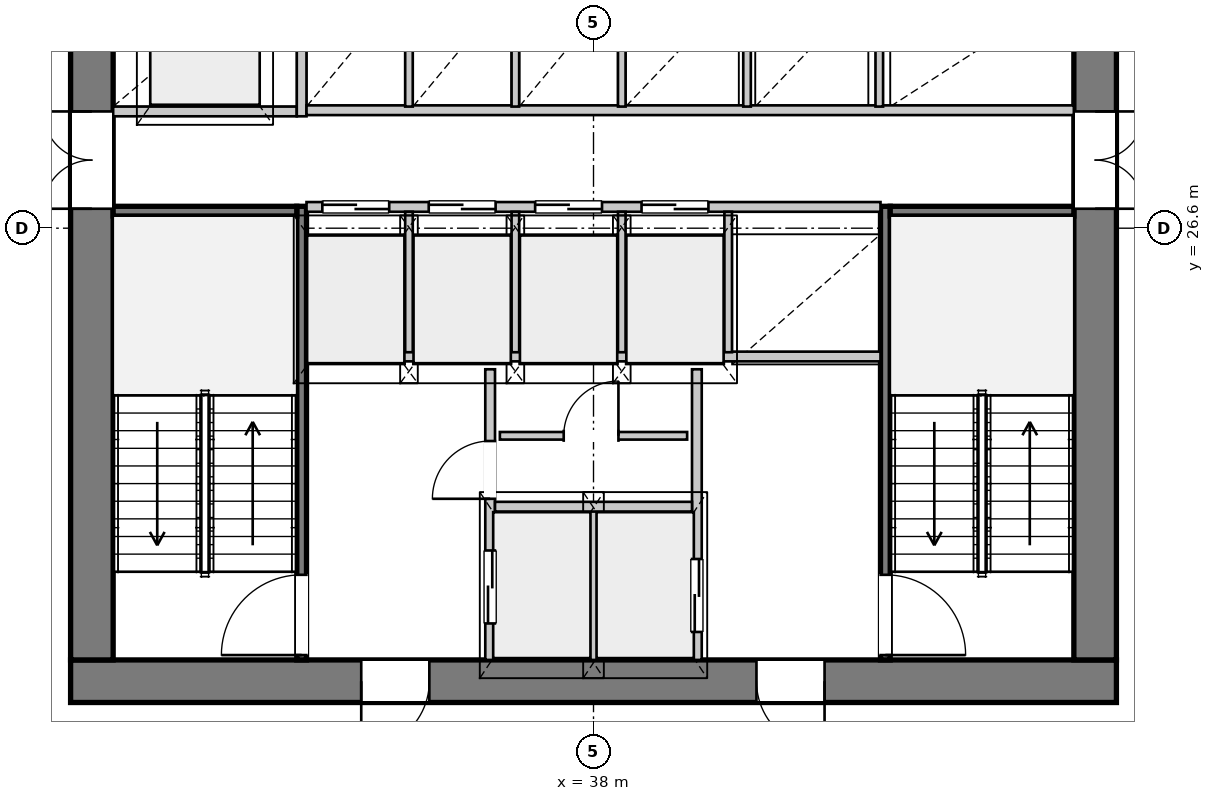
"""IFC4 building model, lengths in metres.
Left out: names, types, materials, properties, quantities, classifications, styles, units other than length and angle.
Written with IfcOpenShell. Run it as: python <this file> out.ifc"""

import sys

from ifc_helpers import new_model, si_unit, direction, frame, frame_2d, origin, place, context, subcontext, project, spatial, rectangle, extrude, source, transform, mapped, element, fill, save


model = new_model("IFC4")
c1 = context("Model", 3, precision=1e-05, world=origin(), true_north=direction((0.0, 1.0)))
c2 = subcontext(c1, "Body", "Model", "MODEL_VIEW")
j1 = project(units=[si_unit("LENGTHUNIT", "METRE"), si_unit("PLANEANGLEUNIT", "RADIAN")], contexts=[c1])
p1 = place(None, origin())
s1 = spatial("IfcSite", under=j1, at=p1, CompositionType="ELEMENT")
p2 = place(p1, origin())
s2 = spatial("IfcBuilding", under=s1, at=p2, CompositionType="ELEMENT")
p3 = place(p2, frame((0.0, 0.0, 116.35)))
s3 = spatial("IfcBuildingStorey", under=s2, at=p3, CompositionType="ELEMENT", Elevation=116.35)
p4 = place(p3, frame((46.6, 19.15, 0.0), z_axis=(0.0, 0.0, 1.0), x_axis=(-1.0, 0.0, 0.0)))
e1 = element("IfcWall", 1, at=p4, inside=s3, PredefinedType="SHEAR", context=c2, shape_type="SweptSolid", body=[
    extrude(rectangle(XDim=17.2, YDim=0.7, at=frame_2d((8.6, 0.0))), origin(), (0.0, 0.0, 1.0), 3.3),
])
p5 = place(p4, frame((4.8, 0.0, 0.0)))
e2 = element("IfcOpeningElement", 2, at=p5, cuts=e1, PredefinedType="OPENING", context=c2, shape_type="SweptSolid", body=[
    extrude(rectangle(XDim=1.12, YDim=2.25, at=frame_2d((0.56, 1.125))), frame((0.0, 0.36, 0.0), z_axis=(0.0, -1.0, 0.0), x_axis=(1.0, 0.0, 0.0)), (0.0, 0.0, 1.0), 0.72),
])
p6 = place(p4, frame((11.3, 0.0, 0.0)))
e3 = element("IfcOpeningElement", 3, at=p6, cuts=e1, PredefinedType="OPENING", context=c2, shape_type="SweptSolid", body=[
    extrude(rectangle(XDim=1.12, YDim=2.25, at=frame_2d((0.56, 1.125))), frame((0.0, 0.36, 0.0), z_axis=(0.0, -1.0, 0.0), x_axis=(1.0, 0.0, 0.0)), (0.0, 0.0, 1.0), 0.72),
])
p7 = place(p3, frame((29.75, 19.5, 0.0), z_axis=(0.0, 0.0, 1.0), x_axis=(0.0, 1.0, 0.0)))
e4 = element("IfcWall", 4, at=p7, inside=s3, PredefinedType="SHEAR", context=c2, shape_type="SweptSolid", body=[
    extrude(rectangle(XDim=14.2, YDim=0.7, at=frame_2d((7.1, 0.0))), origin(), (0.0, 0.0, 1.0), 3.3),
])
p8 = place(p7, frame((7.42, 0.0, 0.0)))
e5 = element("IfcOpeningElement", 5, at=p8, cuts=e4, PredefinedType="OPENING", context=c2, shape_type="SweptSolid", body=[
    extrude(rectangle(XDim=1.6, YDim=2.2, at=frame_2d((0.8, 1.1))), frame((0.0, 0.36, 0.0), z_axis=(0.0, -1.0, 0.0), x_axis=(1.0, 0.0, 0.0)), (0.0, 0.0, 1.0), 0.72),
])
p9 = place(p3, frame((46.25, 33.7, 0.0), z_axis=(0.0, 0.0, 1.0), x_axis=(0.0, -1.0, 0.0)))
e6 = element("IfcWall", 6, at=p9, inside=s3, PredefinedType="SHEAR", context=c2, shape_type="SweptSolid", body=[
    extrude(rectangle(XDim=14.2, YDim=0.7, at=frame_2d((7.1, 0.0))), origin(), (0.0, 0.0, 1.0), 3.3),
])
p10 = place(p9, frame((5.18, 0.0, 0.0)))
e7 = element("IfcOpeningElement", 7, at=p10, cuts=e6, PredefinedType="OPENING", context=c2, shape_type="SweptSolid", body=[
    extrude(rectangle(XDim=1.6, YDim=2.2, at=frame_2d((0.8, 1.1))), frame((0.0, 0.36, 0.0), z_axis=(0.0, -1.0, 0.0), x_axis=(1.0, 0.0, 0.0)), (0.0, 0.0, 1.0), 0.72),
])
p11 = place(p3, frame((33.2, 19.5, 0.0), z_axis=(0.0, 0.0, 1.0), x_axis=(0.0, 1.0, 0.0)))
e8 = element("IfcWall", 8, at=p11, inside=s3, PredefinedType="PARTITIONING", context=c2, shape_type="SweptSolid", body=[
    extrude(rectangle(XDim=7.46, YDim=0.16, at=frame_2d((3.73, 0.0))), origin(), (0.0, 0.0, 1.0), 3.3),
])
p12 = place(p11, frame((0.08, 0.0, 0.0)))
e9 = element("IfcOpeningElement", 9, at=p12, cuts=e8, PredefinedType="OPENING", context=c2, shape_type="SweptSolid", body=[
    extrude(rectangle(XDim=1.32, YDim=2.2, at=frame_2d((0.66, 1.1))), frame((0.0, 0.09, 0.0), z_axis=(0.0, -1.0, 0.0), x_axis=(1.0, 0.0, 0.0)), (0.0, 0.0, 1.0), 0.18),
])
p13 = place(p3, frame((30.1, 26.88, 0.0), z_axis=(0.0, 0.0, 1.0), x_axis=(1.0, 0.0, 0.0)))
e10 = element("IfcWall", 10, at=p13, inside=s3, PredefinedType="PARTITIONING", context=c2, shape_type="SweptSolid", body=[
    extrude(rectangle(XDim=3.02, YDim=0.16, at=frame_2d((1.51, 0.0))), origin(), (0.0, 0.0, 1.0), 3.3),
])
p14 = place(p3, frame((42.8, 26.96, 0.0), z_axis=(0.0, 0.0, 1.0), x_axis=(0.0, -1.0, 0.0)))
e11 = element("IfcWall", 11, at=p14, inside=s3, PredefinedType="PARTITIONING", context=c2, shape_type="SweptSolid", body=[
    extrude(rectangle(XDim=7.46, YDim=0.16, at=frame_2d((3.73, 0.0))), origin(), (0.0, 0.0, 1.0), 3.3),
])
p15 = place(p14, frame((6.06, 0.0, 0.0)))
e12 = element("IfcOpeningElement", 12, at=p15, cuts=e11, PredefinedType="OPENING", context=c2, shape_type="SweptSolid", body=[
    extrude(rectangle(XDim=1.32, YDim=2.2, at=frame_2d((0.66, 1.1))), frame((0.0, 0.09, 0.0), z_axis=(0.0, -1.0, 0.0), x_axis=(1.0, 0.0, 0.0)), (0.0, 0.0, 1.0), 0.18),
])
p16 = place(p3, frame((42.88, 26.88, 0.0), z_axis=(0.0, 0.0, 1.0), x_axis=(1.0, 0.0, 0.0)))
e13 = element("IfcWall", 13, at=p16, inside=s3, PredefinedType="PARTITIONING", context=c2, shape_type="SweptSolid", body=[
    extrude(rectangle(XDim=3.02, YDim=0.16, at=frame_2d((1.51, 0.0))), origin(), (0.0, 0.0, 1.0), 3.3),
])
p17 = place(p3, frame((36.3, 19.5, 0.0), z_axis=(0.0, 0.0, 1.0), x_axis=(0.0, 1.0, 0.0)))
e14 = element("IfcWall", 14, at=p17, inside=s3, PredefinedType="PARTITIONING", context=c2, shape_type="SweptSolid", body=[
    extrude(rectangle(XDim=4.78, YDim=0.16, at=frame_2d((2.39, 0.0))), origin(), (0.0, 0.0, 1.0), 3.3),
])
p18 = place(p17, frame((0.6, 0.0, 0.0)))
e15 = element("IfcOpeningElement", 15, at=p18, cuts=e14, PredefinedType="OPENING", context=c2, shape_type="SweptSolid", body=[
    extrude(rectangle(XDim=1.2, YDim=2.2, at=frame_2d((0.6, 1.1))), frame((0.0, 0.09, 0.0), z_axis=(0.0, -1.0, 0.0), x_axis=(1.0, 0.0, 0.0)), (0.0, 0.0, 1.0), 0.18),
])
p19 = place(p17, frame((2.65, 0.0, 0.0)))
e16 = element("IfcOpeningElement", 16, at=p19, cuts=e14, PredefinedType="OPENING", context=c2, shape_type="SweptSolid", body=[
    extrude(rectangle(XDim=0.95, YDim=2.1, at=frame_2d((0.475, 1.05))), frame((0.0, 0.09, 0.0), z_axis=(0.0, -1.0, 0.0), x_axis=(1.0, 0.0, 0.0)), (0.0, 0.0, 1.0), 0.18),
])
p20 = place(p3, frame((39.7, 24.28, 0.0), z_axis=(0.0, 0.0, 1.0), x_axis=(0.0, -1.0, 0.0)))
e17 = element("IfcWall", 17, at=p20, inside=s3, PredefinedType="PARTITIONING", context=c2, shape_type="SweptSolid", body=[
    extrude(rectangle(XDim=4.78, YDim=0.16, at=frame_2d((2.39, 0.0))), origin(), (0.0, 0.0, 1.0), 3.3),
])
p21 = place(p20, frame((3.12, 0.0, 0.0)))
e18 = element("IfcOpeningElement", 18, at=p21, cuts=e17, PredefinedType="OPENING", context=c2, shape_type="SweptSolid", body=[
    extrude(rectangle(XDim=1.2, YDim=2.2, at=frame_2d((0.6, 1.1))), frame((0.0, 0.09, 0.0), z_axis=(0.0, -1.0, 0.0), x_axis=(1.0, 0.0, 0.0)), (0.0, 0.0, 1.0), 0.18),
])
p22 = place(p3, frame((38.0, 19.5, 0.0), z_axis=(0.0, 0.0, 1.0), x_axis=(0.0, 1.0, 0.0)))
e19 = element("IfcWall", 19, at=p22, inside=s3, PredefinedType="PARTITIONING", context=c2, shape_type="SweptSolid", body=[
    extrude(rectangle(XDim=2.46, YDim=0.125, at=frame_2d((1.23, 0.0))), origin(), (0.0, 0.0, 1.0), 3.3),
])
p23 = place(p3, frame((36.38, 22.02, 0.0), z_axis=(0.0, 0.0, 1.0), x_axis=(1.0, 0.0, 0.0)))
e20 = element("IfcWall", 20, at=p23, inside=s3, PredefinedType="PARTITIONING", context=c2, shape_type="SweptSolid", body=[
    extrude(rectangle(XDim=3.24, YDim=0.16, at=frame_2d((1.62, 0.0))), origin(), (0.0, 0.0, 1.0), 3.3),
])
p24 = place(p3, frame((33.28, 24.49, 0.0), z_axis=(0.0, 0.0, 1.0), x_axis=(1.0, 0.0, 0.0)))
e21 = element("IfcWall", 21, at=p24, inside=s3, PredefinedType="PARTITIONING", context=c2, shape_type="SweptSolid", body=[
    extrude(rectangle(XDim=9.44, YDim=0.16, at=frame_2d((4.72, 0.0))), origin(), (0.0, 0.0, 1.0), 3.3),
])
p25 = place(p3, frame((36.46, 23.186, 0.0), z_axis=(0.0, 0.0, 1.0), x_axis=(1.0, 0.0, 0.0)))
e22 = element("IfcWall", 22, at=p25, inside=s3, PredefinedType="PARTITIONING", context=c2, shape_type="SweptSolid", body=[
    extrude(rectangle(XDim=3.08, YDim=0.125, at=frame_2d((1.54, 0.0))), origin(), (0.0, 0.0, 1.0), 3.3),
])
p26 = place(p25, frame((1.05, 0.0, 0.0)))
e23 = element("IfcOpeningElement", 23, at=p26, cuts=e22, PredefinedType="OPENING", context=c2, shape_type="SweptSolid", body=[
    extrude(rectangle(XDim=0.9, YDim=2.1, at=frame_2d((0.45, 1.05))), frame((0.0, 0.073, 0.0), z_axis=(0.0, -1.0, 0.0), x_axis=(1.0, 0.0, 0.0)), (0.0, 0.0, 1.0), 0.145),
])
p27 = place(p3, frame((30.1, 28.52, 0.0), z_axis=(0.0, 0.0, 1.0), x_axis=(1.0, 0.0, 0.0)))
e24 = element("IfcWall", 24, at=p27, inside=s3, PredefinedType="PARTITIONING", context=c2, shape_type="SweptSolid", body=[
    extrude(rectangle(XDim=3.02, YDim=0.16, at=frame_2d((1.51, 0.0))), origin(), (0.0, 0.0, 1.0), 3.3),
])
p28 = place(p3, frame((33.2, 28.44, 0.0), z_axis=(0.0, 0.0, 1.0), x_axis=(0.0, 1.0, 0.0)))
e25 = element("IfcWall", 25, at=p28, inside=s3, PredefinedType="PARTITIONING", context=c2, shape_type="SweptSolid", body=[
    extrude(rectangle(XDim=5.26, YDim=0.16, at=frame_2d((2.63, 0.0))), origin(), (0.0, 0.0, 1.0), 3.3),
])
p29 = place(p3, frame((33.28, 26.95, 0.0), z_axis=(0.0, 0.0, 1.0), x_axis=(1.0, 0.0, 0.0)))
e26 = element("IfcWall", 26, at=p29, inside=s3, PredefinedType="PARTITIONING", context=c2, shape_type="SweptSolid", body=[
    extrude(rectangle(XDim=9.44, YDim=0.16, at=frame_2d((4.72, 0.0))), origin(), (0.0, 0.0, 1.0), 3.3),
])
p30 = place(p29, frame((0.26, 0.0, 0.0)))
e27 = element("IfcOpeningElement", 27, at=p30, cuts=e26, PredefinedType="OPENING", context=c2, shape_type="SweptSolid", body=[
    extrude(rectangle(XDim=1.1, YDim=2.2, at=frame_2d((0.55, 1.1))), frame((0.0, 0.09, 0.0), z_axis=(0.0, -1.0, 0.0), x_axis=(1.0, 0.0, 0.0)), (0.0, 0.0, 1.0), 0.18),
])
p31 = place(p29, frame((2.01, 0.0, 0.0)))
e28 = element("IfcOpeningElement", 28, at=p31, cuts=e26, PredefinedType="OPENING", context=c2, shape_type="SweptSolid", body=[
    extrude(rectangle(XDim=1.1, YDim=2.2, at=frame_2d((0.55, 1.1))), frame((0.0, 0.09, 0.0), z_axis=(0.0, -1.0, 0.0), x_axis=(1.0, 0.0, 0.0)), (0.0, 0.0, 1.0), 0.18),
])
p32 = place(p29, frame((3.76, 0.0, 0.0)))
e29 = element("IfcOpeningElement", 29, at=p32, cuts=e26, PredefinedType="OPENING", context=c2, shape_type="SweptSolid", body=[
    extrude(rectangle(XDim=1.1, YDim=2.2, at=frame_2d((0.55, 1.1))), frame((0.0, 0.09, 0.0), z_axis=(0.0, -1.0, 0.0), x_axis=(1.0, 0.0, 0.0)), (0.0, 0.0, 1.0), 0.18),
])
p33 = place(p29, frame((5.51, 0.0, 0.0)))
e30 = element("IfcOpeningElement", 30, at=p33, cuts=e26, PredefinedType="OPENING", context=c2, shape_type="SweptSolid", body=[
    extrude(rectangle(XDim=1.1, YDim=2.2, at=frame_2d((0.55, 1.1))), frame((0.0, 0.09, 0.0), z_axis=(0.0, -1.0, 0.0), x_axis=(1.0, 0.0, 0.0)), (0.0, 0.0, 1.0), 0.18),
])
for number, where, z_axis, x_axis in (
    (31, (34.965, 24.56, 0.0), (0.0, 0.0, 1.0), (0.0, 1.0, 0.0)),
    (32, (36.715, 24.56, 0.0), (0.0, 0.0, 1.0), (0.0, 1.0, 0.0)),
    (33, (38.465, 24.56, 0.0), (0.0, 0.0, 1.0), (0.0, 1.0, 0.0)),
    (34, (40.215, 24.56, 0.0), (0.0, 0.0, 1.0), (0.0, 1.0, 0.0)),
):
    element("IfcWall", number, at=place(p3, frame(where, z_axis=z_axis, x_axis=x_axis)), inside=s3, PredefinedType="PARTITIONING", context=c2, shape_type="SweptSolid", body=[
        extrude(rectangle(XDim=2.31, YDim=0.125, at=frame_2d((1.155, 0.0))), origin(), (0.0, 0.0, 1.0), 3.3),
    ])
p34 = place(p3, frame((33.28, 28.54, 0.0), z_axis=(0.0, 0.0, 1.0), x_axis=(1.0, 0.0, 0.0)))
e35 = element("IfcWall", 35, at=p34, inside=s3, PredefinedType="PARTITIONING", context=c2, shape_type="SweptSolid", body=[
    extrude(rectangle(XDim=12.62, YDim=0.16, at=frame_2d((6.31, 0.0))), origin(), (0.0, 0.0, 1.0), 3.3),
])
for number, where, z_axis, x_axis in (
    (36, (34.965, 28.6, 0.0), (0.0, 0.0, 1.0), (0.0, 1.0, 0.0)),
    (37, (36.715, 28.6, 0.0), (0.0, 0.0, 1.0), (0.0, 1.0, 0.0)),
    (38, (38.465, 28.6, 0.0), (0.0, 0.0, 1.0), (0.0, 1.0, 0.0)),
    (39, (40.525, 28.6, 0.0), (0.0, 0.0, 1.0), (0.0, 1.0, 0.0)),
    (40, (42.7, 28.6, 0.0), (0.0, 0.0, 1.0), (0.0, 1.0, 0.0)),
):
    element("IfcWall", number, at=place(p3, frame(where, z_axis=z_axis, x_axis=x_axis)), inside=s3, PredefinedType="PARTITIONING", context=c2, shape_type="SweptSolid", body=[
        extrude(rectangle(XDim=1.92, YDim=0.125, at=frame_2d((0.96, 0.0))), origin(), (0.0, 0.0, 1.0), 3.3),
    ])
m1 = source(origin(), c2, "Body", "SweptSolid", [
    extrude(rectangle(XDim=1.12, YDim=2.25, at=frame_2d((0.56, 1.125))), frame((0.0, 0.025, 0.0), z_axis=(0.0, -1.0, 0.0), x_axis=(1.0, 0.0, 0.0)), (0.0, 0.0, 1.0), 0.05),
])
p35 = place(p5, origin())
e41 = element("IfcDoor", 41, at=p35, inside=s3, OperationType="SINGLE_SWING_LEFT", PredefinedType="DOOR", context=c2, shape_type="MappedRepresentation", body=[
    mapped(m1, transform((0.0, 0.0, 0.0), x_axis=(1.0, 0.0, 0.0), y_axis=(0.0, 1.0, 0.0), z_axis=(0.0, 0.0, 1.0), scale=1.0)),
])
fill(e2, e41)
p36 = place(p6, origin())
e42 = element("IfcDoor", 42, at=p36, inside=s3, OperationType="SINGLE_SWING_RIGHT", PredefinedType="DOOR", context=c2, shape_type="MappedRepresentation", body=[
    mapped(m1, transform((0.0, 0.0, 0.0), x_axis=(1.0, 0.0, 0.0), y_axis=(0.0, 1.0, 0.0), z_axis=(0.0, 0.0, 1.0), scale=1.0)),
])
fill(e3, e42)
m2 = source(origin(), c2, "Body", "SweptSolid", [
    extrude(rectangle(XDim=1.6, YDim=2.2, at=frame_2d((0.8, 1.1))), frame((0.0, 0.025, 0.0), z_axis=(0.0, -1.0, 0.0), x_axis=(1.0, 0.0, 0.0)), (0.0, 0.0, 1.0), 0.05),
])
p37 = place(p8, origin())
e43 = element("IfcDoor", 43, at=p37, inside=s3, OperationType="DOUBLE_DOOR_SINGLE_SWING", PredefinedType="DOOR", context=c2, shape_type="MappedRepresentation", body=[
    mapped(m2, transform((0.0, 0.0, 0.0), x_axis=(1.0, 0.0, 0.0), y_axis=(0.0, 1.0, 0.0), z_axis=(0.0, 0.0, 1.0), scale=1.0)),
])
fill(e5, e43)
p38 = place(p10, origin())
e44 = element("IfcDoor", 44, at=p38, inside=s3, OperationType="DOUBLE_DOOR_SINGLE_SWING", PredefinedType="DOOR", context=c2, shape_type="MappedRepresentation", body=[
    mapped(m2, transform((0.0, 0.0, 0.0), x_axis=(1.0, 0.0, 0.0), y_axis=(0.0, 1.0, 0.0), z_axis=(0.0, 0.0, 1.0), scale=1.0)),
])
fill(e7, e44)
m3 = source(origin(), c2, "Body", "SweptSolid", [
    extrude(rectangle(XDim=1.32, YDim=2.2, at=frame_2d((0.66, 1.1))), frame((0.0, 0.025, 0.0), z_axis=(0.0, -1.0, 0.0), x_axis=(1.0, 0.0, 0.0)), (0.0, 0.0, 1.0), 0.05),
])
p39 = place(p12, origin())
e45 = element("IfcDoor", 45, at=p39, inside=s3, OperationType="SINGLE_SWING_LEFT", PredefinedType="DOOR", context=c2, shape_type="MappedRepresentation", body=[
    mapped(m3, transform((0.0, 0.0, 0.0), x_axis=(1.0, 0.0, 0.0), y_axis=(0.0, 1.0, 0.0), z_axis=(0.0, 0.0, 1.0), scale=1.0)),
])
fill(e9, e45)
p40 = place(p15, origin())
e46 = element("IfcDoor", 46, at=p40, inside=s3, OperationType="SINGLE_SWING_RIGHT", PredefinedType="DOOR", context=c2, shape_type="MappedRepresentation", body=[
    mapped(m3, transform((0.0, 0.0, 0.0), x_axis=(1.0, 0.0, 0.0), y_axis=(0.0, 1.0, 0.0), z_axis=(0.0, 0.0, 1.0), scale=1.0)),
])
fill(e12, e46)
m4 = source(origin(), c2, "Body", "SweptSolid", [
    extrude(rectangle(XDim=1.2, YDim=2.2, at=frame_2d((0.6, 1.1))), frame((0.0, 0.025, 0.0), z_axis=(0.0, -1.0, 0.0), x_axis=(1.0, 0.0, 0.0)), (0.0, 0.0, 1.0), 0.05),
])
p41 = place(p18, origin())
e47 = element("IfcDoor", 47, at=p41, inside=s3, OperationType="DOUBLE_DOOR_SLIDING", PredefinedType="DOOR", context=c2, shape_type="MappedRepresentation", body=[
    mapped(m4, transform((0.0, 0.0, 0.0), x_axis=(1.0, 0.0, 0.0), y_axis=(0.0, 1.0, 0.0), z_axis=(0.0, 0.0, 1.0), scale=1.0)),
])
fill(e15, e47)
m5 = source(origin(), c2, "Body", "SweptSolid", [
    extrude(rectangle(XDim=0.95, YDim=2.1, at=frame_2d((0.475, 1.05))), frame((0.0, 0.025, 0.0), z_axis=(0.0, -1.0, 0.0), x_axis=(1.0, 0.0, 0.0)), (0.0, 0.0, 1.0), 0.05),
])
p42 = place(p19, origin())
e48 = element("IfcDoor", 48, at=p42, inside=s3, OperationType="SINGLE_SWING_LEFT", PredefinedType="DOOR", context=c2, shape_type="MappedRepresentation", body=[
    mapped(m5, transform((0.0, 0.0, 0.0), x_axis=(1.0, 0.0, 0.0), y_axis=(0.0, 1.0, 0.0), z_axis=(0.0, 0.0, 1.0), scale=1.0)),
])
fill(e16, e48)
m6 = source(origin(), c2, "Body", "SweptSolid", [
    extrude(rectangle(XDim=0.9, YDim=2.1, at=frame_2d((0.45, 1.05))), frame((0.0, 0.025, 0.0), z_axis=(0.0, -1.0, 0.0), x_axis=(1.0, 0.0, 0.0)), (0.0, 0.0, 1.0), 0.05),
])
p43 = place(p26, origin())
e49 = element("IfcDoor", 49, at=p43, inside=s3, OperationType="SINGLE_SWING_RIGHT", PredefinedType="DOOR", context=c2, shape_type="MappedRepresentation", body=[
    mapped(m6, transform((0.0, 0.0, 0.0), x_axis=(1.0, 0.0, 0.0), y_axis=(0.0, 1.0, 0.0), z_axis=(0.0, 0.0, 1.0), scale=1.0)),
])
fill(e23, e49)
p44 = place(p21, origin())
e50 = element("IfcDoor", 50, at=p44, inside=s3, OperationType="DOUBLE_DOOR_SLIDING", PredefinedType="DOOR", context=c2, shape_type="MappedRepresentation", body=[
    mapped(m4, transform((0.0, 0.0, 0.0), x_axis=(1.0, 0.0, 0.0), y_axis=(0.0, 1.0, 0.0), z_axis=(0.0, 0.0, 1.0), scale=1.0)),
])
fill(e18, e50)
m7 = source(origin(), c2, "Body", "SweptSolid", [
    extrude(rectangle(XDim=1.1, YDim=2.2, at=frame_2d((0.55, 1.1))), frame((0.0, 0.025, 0.0), z_axis=(0.0, -1.0, 0.0), x_axis=(1.0, 0.0, 0.0)), (0.0, 0.0, 1.0), 0.05),
])
p45 = place(p30, origin())
e51 = element("IfcDoor", 51, at=p45, inside=s3, OperationType="DOUBLE_DOOR_SLIDING", PredefinedType="DOOR", context=c2, shape_type="MappedRepresentation", body=[
    mapped(m7, transform((0.0, 0.0, 0.0), x_axis=(1.0, 0.0, 0.0), y_axis=(0.0, 1.0, 0.0), z_axis=(0.0, 0.0, 1.0), scale=1.0)),
])
fill(e27, e51)
p46 = place(p31, origin())
e52 = element("IfcDoor", 52, at=p46, inside=s3, OperationType="DOUBLE_DOOR_SLIDING", PredefinedType="DOOR", context=c2, shape_type="MappedRepresentation", body=[
    mapped(m7, transform((0.0, 0.0, 0.0), x_axis=(1.0, 0.0, 0.0), y_axis=(0.0, 1.0, 0.0), z_axis=(0.0, 0.0, 1.0), scale=1.0)),
])
fill(e28, e52)
p47 = place(p32, origin())
e53 = element("IfcDoor", 53, at=p47, inside=s3, OperationType="DOUBLE_DOOR_SLIDING", PredefinedType="DOOR", context=c2, shape_type="MappedRepresentation", body=[
    mapped(m7, transform((0.0, 0.0, 0.0), x_axis=(1.0, 0.0, 0.0), y_axis=(0.0, 1.0, 0.0), z_axis=(0.0, 0.0, 1.0), scale=1.0)),
])
fill(e29, e53)
p48 = place(p33, origin())
e54 = element("IfcDoor", 54, at=p48, inside=s3, OperationType="DOUBLE_DOOR_SLIDING", PredefinedType="DOOR", context=c2, shape_type="MappedRepresentation", body=[
    mapped(m7, transform((0.0, 0.0, 0.0), x_axis=(1.0, 0.0, 0.0), y_axis=(0.0, 1.0, 0.0), z_axis=(0.0, 0.0, 1.0), scale=1.0)),
])
fill(e30, e54)
save(model, sys.argv[1])
